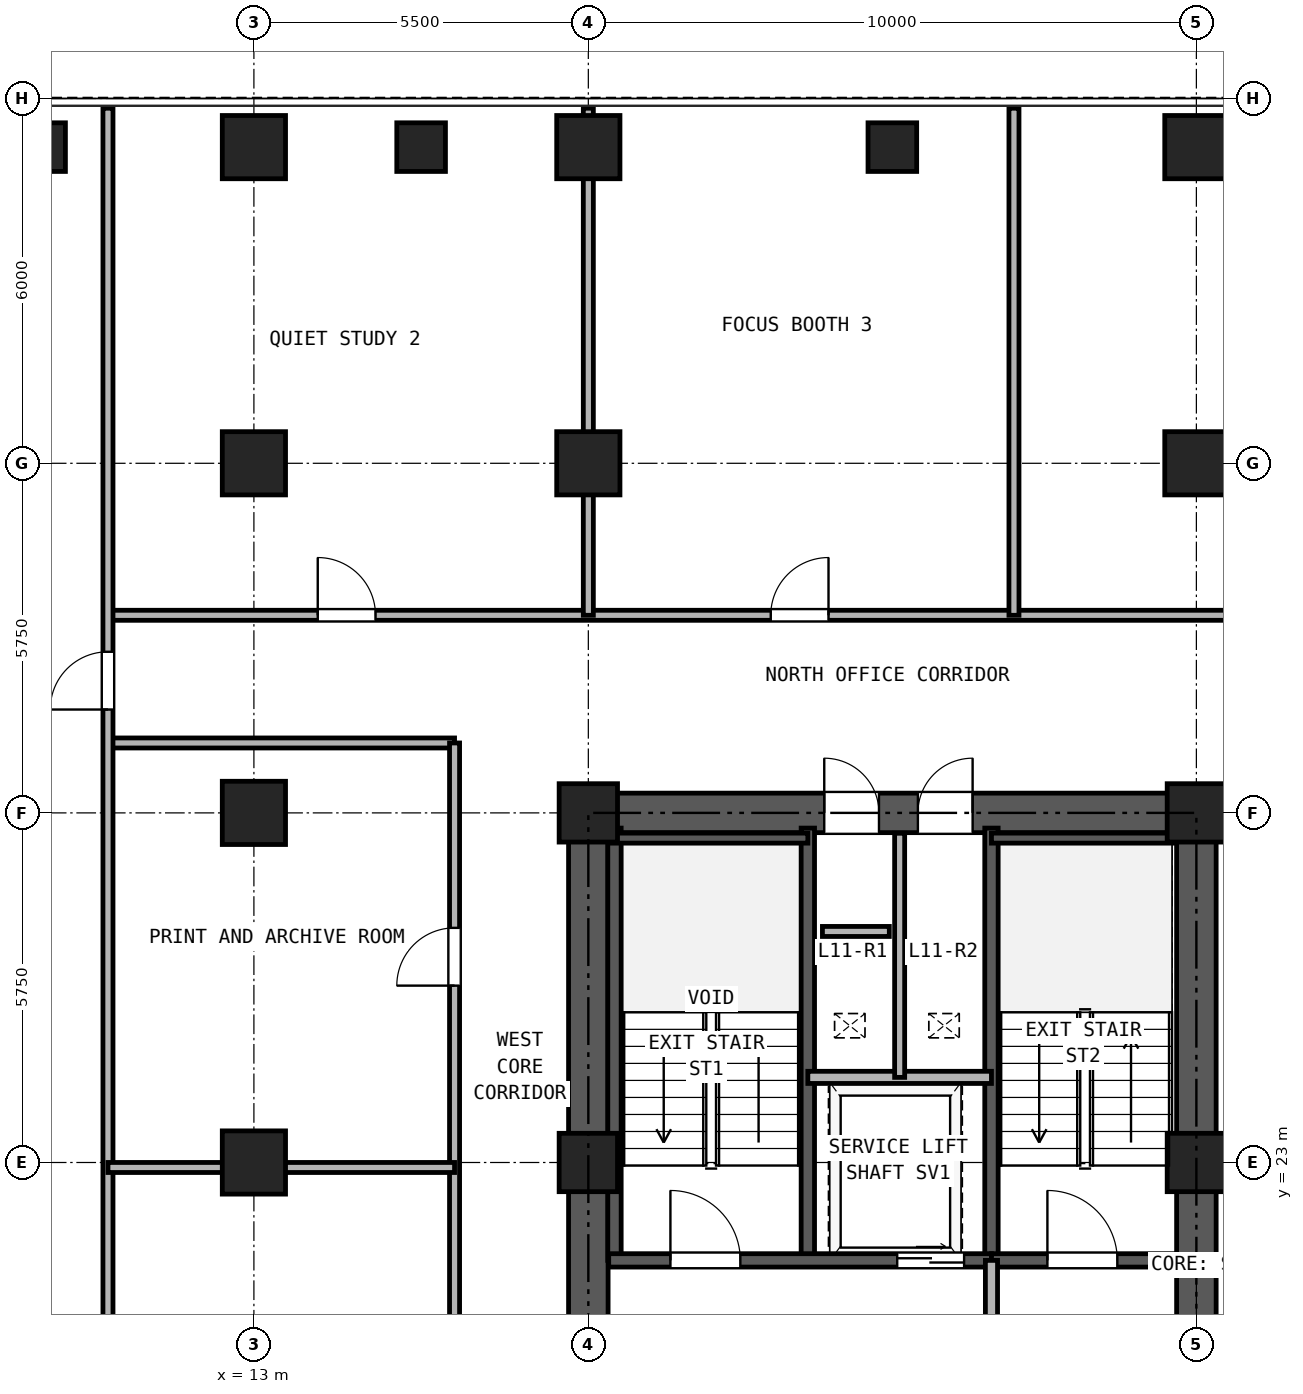
"""IFC4 building model, lengths in metres.
Left out: names, types, materials, properties, quantities, classifications, styles, units other than length and angle.
Written with IfcOpenShell. Run it as: python <this file> out.ifc"""

import sys

from ifc_helpers import new_model, si_unit, direction, frame, frame_2d, origin, origin_2d, place, context, subcontext, project, spatial, rectangle, hollow_rectangle, extrude, source, transform, mapped, element, fill, save


model = new_model("IFC4")
c1 = context("Model", 3, precision=1e-05, world=origin(), true_north=direction((0.0, 1.0)))
c2 = subcontext(c1, "Body", "Model", "MODEL_VIEW")
j1 = project(units=[si_unit("LENGTHUNIT", "METRE"), si_unit("PLANEANGLEUNIT", "RADIAN")], contexts=[c1])
p1 = place(None, origin())
s1 = spatial("IfcSite", under=j1, at=p1, CompositionType="ELEMENT")
p2 = place(p1, origin())
s2 = spatial("IfcBuilding", under=s1, at=p2, CompositionType="ELEMENT")
p3 = place(p2, frame((0.0, 0.0, 44.1)))
s3 = spatial("IfcBuildingStorey", under=s2, at=p3, CompositionType="ELEMENT", Elevation=44.1)
m1 = source(origin(), c2, "Body", "SweptSolid", [
    extrude(hollow_rectangle(XDim=1.04, YDim=1.04, WallThickness=0.065, at=origin_2d()), origin(), (0.0, 0.0, 1.0), 3.32),
])
for number, where, z_axis, x_axis in (
    (1, (13.0, 39.7, 0.0), (0.0, 0.0, 1.0), (1.0, 0.0, 0.0)),
    (2, (18.5, 39.7, 0.0), (0.0, 0.0, 1.0), (1.0, 0.0, 0.0)),
    (3, (28.5, 39.7, 0.0), (0.0, 0.0, 1.0), (1.0, 0.0, 0.0)),
    (4, (13.0, 23.0, 0.0), (0.0, 0.0, 1.0), (1.0, 0.0, 0.0)),
    (5, (13.0, 28.75, 0.0), (0.0, 0.0, 1.0), (1.0, 0.0, 0.0)),
    (6, (13.0, 34.5, 0.0), (0.0, 0.0, 1.0), (1.0, 0.0, 0.0)),
):
    element("IfcColumn", number, at=place(p3, frame(where, z_axis=z_axis, x_axis=x_axis)), inside=s3, PredefinedType="COLUMN", context=c2, shape_type="MappedRepresentation", body=[
        mapped(m1, transform((0.0, 0.0, 0.0), x_axis=(1.0, 0.0, 0.0), y_axis=(0.0, 1.0, 0.0), z_axis=(0.0, 0.0, 1.0), scale=1.0)),
    ])
m2 = source(origin(), c2, "Body", "SweptSolid", [
    extrude(hollow_rectangle(XDim=0.96, YDim=0.96, WallThickness=0.06, at=origin_2d()), origin(), (0.0, 0.0, 1.0), 3.32),
])
for number, where, z_axis, x_axis in (
    (7, (18.5, 23.0, 0.0), (0.0, 0.0, 1.0), (1.0, 0.0, 0.0)),
    (8, (18.5, 28.75, 0.0), (0.0, 0.0, 1.0), (1.0, 0.0, 0.0)),
):
    element("IfcColumn", number, at=place(p3, frame(where, z_axis=z_axis, x_axis=x_axis)), inside=s3, PredefinedType="COLUMN", context=c2, shape_type="MappedRepresentation", body=[
        mapped(m2, transform((0.0, 0.0, 0.0), x_axis=(1.0, 0.0, 0.0), y_axis=(0.0, 1.0, 0.0), z_axis=(0.0, 0.0, 1.0), scale=1.0)),
    ])
p4 = place(p3, frame((18.5, 34.5, 0.0), z_axis=(0.0, 0.0, 1.0), x_axis=(1.0, 0.0, 0.0)))
e9 = element("IfcColumn", 9, at=p4, inside=s3, PredefinedType="COLUMN", context=c2, shape_type="MappedRepresentation", body=[
    mapped(m1, transform((0.0, 0.0, 0.0), x_axis=(1.0, 0.0, 0.0), y_axis=(0.0, 1.0, 0.0), z_axis=(0.0, 0.0, 1.0), scale=1.0)),
])
for number, where, z_axis, x_axis in (
    (10, (28.5, 23.0, 0.0), (0.0, 0.0, 1.0), (1.0, 0.0, 0.0)),
    (11, (28.5, 28.75, 0.0), (0.0, 0.0, 1.0), (1.0, 0.0, 0.0)),
):
    element("IfcColumn", number, at=place(p3, frame(where, z_axis=z_axis, x_axis=x_axis)), inside=s3, PredefinedType="COLUMN", context=c2, shape_type="MappedRepresentation", body=[
        mapped(m2, transform((0.0, 0.0, 0.0), x_axis=(1.0, 0.0, 0.0), y_axis=(0.0, 1.0, 0.0), z_axis=(0.0, 0.0, 1.0), scale=1.0)),
    ])
p5 = place(p3, frame((28.5, 34.5, 0.0), z_axis=(0.0, 0.0, 1.0), x_axis=(1.0, 0.0, 0.0)))
e12 = element("IfcColumn", 12, at=p5, inside=s3, PredefinedType="COLUMN", context=c2, shape_type="MappedRepresentation", body=[
    mapped(m1, transform((0.0, 0.0, 0.0), x_axis=(1.0, 0.0, 0.0), y_axis=(0.0, 1.0, 0.0), z_axis=(0.0, 0.0, 1.0), scale=1.0)),
])
m3 = source(origin(), c2, "Body", "SweptSolid", [
    extrude(hollow_rectangle(XDim=0.8, YDim=0.8, WallThickness=0.045, at=origin_2d()), origin(), (0.0, 0.0, 1.0), 3.32),
])
for number, where, z_axis, x_axis in (
    (13, (9.5, 39.7, 0.0), (0.0, 0.0, 1.0), (1.0, 0.0, 0.0)),
    (14, (15.75, 39.7, 0.0), (0.0, 0.0, 1.0), (1.0, 0.0, 0.0)),
    (15, (23.5, 39.7, 0.0), (0.0, 0.0, 1.0), (1.0, 0.0, 0.0)),
):
    element("IfcColumn", number, at=place(p3, frame(where, z_axis=z_axis, x_axis=x_axis)), inside=s3, PredefinedType="COLUMN", context=c2, shape_type="MappedRepresentation", body=[
        mapped(m3, transform((0.0, 0.0, 0.0), x_axis=(1.0, 0.0, 0.0), y_axis=(0.0, 1.0, 0.0), z_axis=(0.0, 0.0, 1.0), scale=1.0)),
    ])
p6 = place(p3, frame((18.175, 28.75, 0.0), z_axis=(0.0, 0.0, 1.0), x_axis=(1.0, 0.0, 0.0)))
e16 = element("IfcWall", 16, at=p6, inside=s3, PredefinedType="SHEAR", context=c2, shape_type="SweptSolid", body=[
    extrude(rectangle(XDim=10.65, YDim=0.65, at=frame_2d((5.325, 0.0))), origin(), (0.0, 0.0, 1.0), 3.32),
])
p7 = place(p6, frame((4.205, 0.0, 0.0)))
e17 = element("IfcOpeningElement", 17, at=p7, cuts=e16, PredefinedType="OPENING", context=c2, shape_type="SweptSolid", body=[
    extrude(rectangle(XDim=0.9, YDim=2.05, at=frame_2d((0.45, 1.025))), frame((0.0, 0.335, 0.0), z_axis=(0.0, -1.0, 0.0), x_axis=(1.0, 0.0, 0.0)), (0.0, 0.0, 1.0), 0.67),
])
p8 = place(p6, frame((5.745, 0.0, 0.0)))
e18 = element("IfcOpeningElement", 18, at=p8, cuts=e16, PredefinedType="OPENING", context=c2, shape_type="SweptSolid", body=[
    extrude(rectangle(XDim=0.9, YDim=2.05, at=frame_2d((0.45, 1.025))), frame((0.0, 0.335, 0.0), z_axis=(0.0, -1.0, 0.0), x_axis=(1.0, 0.0, 0.0)), (0.0, 0.0, 1.0), 0.67),
])
p9 = place(p3, frame((18.5, 11.825, 0.0), z_axis=(0.0, 0.0, 1.0), x_axis=(0.0, 1.0, 0.0)))
e19 = element("IfcWall", 19, at=p9, inside=s3, PredefinedType="SHEAR", context=c2, shape_type="SweptSolid", body=[
    extrude(rectangle(XDim=16.6, YDim=0.65, at=frame_2d((8.3, 0.0))), origin(), (0.0, 0.0, 1.0), 3.32),
])
p10 = place(p9, frame((7.325, 0.0, 0.0)))
e20 = element("IfcOpeningElement", 20, at=p10, cuts=e19, PredefinedType="OPENING", context=c2, shape_type="SweptSolid", body=[
    extrude(rectangle(XDim=1.15, YDim=2.2, at=frame_2d((0.575, 1.1))), frame((0.0, 0.335, 0.0), z_axis=(0.0, -1.0, 0.0), x_axis=(1.0, 0.0, 0.0)), (0.0, 0.0, 1.0), 0.67),
])
p11 = place(p3, frame((28.5, 11.825, 0.0), z_axis=(0.0, 0.0, 1.0), x_axis=(0.0, 1.0, 0.0)))
e21 = element("IfcWall", 21, at=p11, inside=s3, PredefinedType="SHEAR", context=c2, shape_type="SweptSolid", body=[
    extrude(rectangle(XDim=16.6, YDim=0.65, at=frame_2d((8.3, 0.0))), origin(), (0.0, 0.0, 1.0), 3.32),
])
p12 = place(p11, frame((7.325, 0.0, 0.0)))
e22 = element("IfcOpeningElement", 22, at=p12, cuts=e21, PredefinedType="OPENING", context=c2, shape_type="SweptSolid", body=[
    extrude(rectangle(XDim=1.15, YDim=2.2, at=frame_2d((0.575, 1.1))), frame((0.0, 0.335, 0.0), z_axis=(0.0, -1.0, 0.0), x_axis=(1.0, 0.0, 0.0)), (0.0, 0.0, 1.0), 0.67),
])
for number, where, z_axis, x_axis in (
    (23, (18.93, 21.39, 0.0), (0.0, 0.0, 1.0), (0.0, 1.0, 0.0)),
    (24, (22.11, 21.39, 0.0), (0.0, 0.0, 1.0), (0.0, 1.0, 0.0)),
    (25, (25.13, 21.39, 0.0), (0.0, 0.0, 1.0), (0.0, 1.0, 0.0)),
):
    element("IfcWall", number, at=place(p3, frame(where, z_axis=z_axis, x_axis=x_axis)), inside=s3, PredefinedType="SOLIDWALL", context=c2, shape_type="SweptSolid", body=[
        extrude(rectangle(XDim=7.11, YDim=0.22, at=frame_2d((3.555, 0.0))), origin(), (0.0, 0.0, 1.0), 3.32),
    ])
p13 = place(p3, frame((18.835, 28.335, 0.0), z_axis=(0.0, 0.0, 1.0), x_axis=(1.0, 0.0, 0.0)))
e26 = element("IfcWall", 26, at=p13, inside=s3, PredefinedType="PARTITIONING", context=c2, shape_type="SweptSolid", body=[
    extrude(rectangle(XDim=3.275, YDim=0.165, at=frame_2d((1.638, 0.0))), origin(), (0.0, 0.0, 1.0), 3.32),
])
p14 = place(p3, frame((25.13, 28.335, 0.0), z_axis=(0.0, 0.0, 1.0), x_axis=(1.0, 0.0, 0.0)))
e27 = element("IfcWall", 27, at=p14, inside=s3, PredefinedType="PARTITIONING", context=c2, shape_type="SweptSolid", body=[
    extrude(rectangle(XDim=3.035, YDim=0.165, at=frame_2d((1.518, 0.0))), origin(), (0.0, 0.0, 1.0), 3.32),
])
p15 = place(p3, frame((18.835, 21.39, 0.0), z_axis=(0.0, 0.0, 1.0), x_axis=(1.0, 0.0, 0.0)))
e28 = element("IfcWall", 28, at=p15, inside=s3, PredefinedType="SOLIDWALL", context=c2, shape_type="SweptSolid", body=[
    extrude(rectangle(XDim=6.295, YDim=0.22, at=frame_2d((3.147, 0.0))), origin(), (0.0, 0.0, 1.0), 3.32),
])
p16 = place(p15, frame((1.015, 0.0, 0.0)))
e29 = element("IfcOpeningElement", 29, at=p16, cuts=e28, PredefinedType="OPENING", context=c2, shape_type="SweptSolid", body=[
    extrude(rectangle(XDim=1.15, YDim=2.2, at=frame_2d((0.575, 1.1))), frame((0.0, 0.12, 0.0), z_axis=(0.0, -1.0, 0.0), x_axis=(1.0, 0.0, 0.0)), (0.0, 0.0, 1.0), 0.24),
])
p17 = place(p15, frame((4.745, 0.0, 0.0)))
e30 = element("IfcOpeningElement", 30, at=p17, cuts=e28, PredefinedType="OPENING", context=c2, shape_type="SweptSolid", body=[
    extrude(rectangle(XDim=1.1, YDim=2.25, at=frame_2d((0.55, 1.125))), frame((0.0, 0.12, 0.0), z_axis=(0.0, -1.0, 0.0), x_axis=(1.0, 0.0, 0.0)), (0.0, 0.0, 1.0), 0.24),
])
p18 = place(p3, frame((25.13, 21.39, 0.0), z_axis=(0.0, 0.0, 1.0), x_axis=(1.0, 0.0, 0.0)))
e31 = element("IfcWall", 31, at=p18, inside=s3, PredefinedType="SOLIDWALL", context=c2, shape_type="SweptSolid", body=[
    extrude(rectangle(XDim=3.035, YDim=0.22, at=frame_2d((1.518, 0.0))), origin(), (0.0, 0.0, 1.0), 3.32),
])
p19 = place(p18, frame((0.92, 0.0, 0.0)))
e32 = element("IfcOpeningElement", 32, at=p19, cuts=e31, PredefinedType="OPENING", context=c2, shape_type="SweptSolid", body=[
    extrude(rectangle(XDim=1.15, YDim=2.2, at=frame_2d((0.575, 1.1))), frame((0.0, 0.12, 0.0), z_axis=(0.0, -1.0, 0.0), x_axis=(1.0, 0.0, 0.0)), (0.0, 0.0, 1.0), 0.24),
])
p20 = place(p3, frame((22.11, 24.4, 0.0), z_axis=(0.0, 0.0, 1.0), x_axis=(1.0, 0.0, 0.0)))
e33 = element("IfcWall", 33, at=p20, inside=s3, PredefinedType="PARTITIONING", context=c2, shape_type="SweptSolid", body=[
    extrude(rectangle(XDim=3.02, YDim=0.2, at=frame_2d((1.51, 0.0))), origin(), (0.0, 0.0, 1.0), 3.32),
])
p21 = place(p3, frame((23.62, 24.4, 0.0), z_axis=(0.0, 0.0, 1.0), x_axis=(0.0, 1.0, 0.0)))
e34 = element("IfcWall", 34, at=p21, inside=s3, PredefinedType="PARTITIONING", context=c2, shape_type="SweptSolid", body=[
    extrude(rectangle(XDim=4.015, YDim=0.165, at=frame_2d((2.008, 0.0))), origin(), (0.0, 0.0, 1.0), 3.32),
])
p22 = place(p3, frame((25.13, 18.0, 0.0), z_axis=(0.0, 0.0, 1.0), x_axis=(0.0, 1.0, 0.0)))
e35 = element("IfcWall", 35, at=p22, inside=s3, PredefinedType="PARTITIONING", context=c2, shape_type="SweptSolid", body=[
    extrude(rectangle(XDim=3.39, YDim=0.2, at=frame_2d((1.695, 0.0))), origin(), (0.0, 0.0, 1.0), 3.32),
])
p23 = place(p22, frame((1.1, 0.0, 0.0)))
e36 = element("IfcOpeningElement", 36, at=p23, cuts=e35, PredefinedType="OPENING", context=c2, shape_type="SweptSolid", body=[
    extrude(rectangle(XDim=1.15, YDim=2.2, at=frame_2d((0.575, 1.1))), frame((0.0, 0.11, 0.0), z_axis=(0.0, -1.0, 0.0), x_axis=(1.0, 0.0, 0.0)), (0.0, 0.0, 1.0), 0.22),
])
p24 = place(p3, frame((10.6, 32.0, 0.0), z_axis=(0.0, 0.0, 1.0), x_axis=(1.0, 0.0, 0.0)))
e37 = element("IfcWall", 37, at=p24, inside=s3, PredefinedType="PARTITIONING", context=c2, shape_type="SweptSolid", body=[
    extrude(rectangle(XDim=25.8, YDim=0.165, at=frame_2d((12.9, 0.0))), origin(), (0.0, 0.0, 1.0), 3.32),
])
p25 = place(p24, frame((3.45, 0.0, 0.0)))
e38 = element("IfcOpeningElement", 38, at=p25, cuts=e37, PredefinedType="OPENING", context=c2, shape_type="SweptSolid", body=[
    extrude(rectangle(XDim=0.95, YDim=2.15, at=frame_2d((0.475, 1.075))), frame((0.0, 0.093, 0.0), z_axis=(0.0, -1.0, 0.0), x_axis=(1.0, 0.0, 0.0)), (0.0, 0.0, 1.0), 0.185),
])
p26 = place(p24, frame((10.9, 0.0, 0.0)))
e39 = element("IfcOpeningElement", 39, at=p26, cuts=e37, PredefinedType="OPENING", context=c2, shape_type="SweptSolid", body=[
    extrude(rectangle(XDim=0.95, YDim=2.15, at=frame_2d((0.475, 1.075))), frame((0.0, 0.093, 0.0), z_axis=(0.0, -1.0, 0.0), x_axis=(1.0, 0.0, 0.0)), (0.0, 0.0, 1.0), 0.185),
])
p27 = place(p24, frame((19.85, 0.0, 0.0)))
e40 = element("IfcOpeningElement", 40, at=p27, cuts=e37, PredefinedType="OPENING", context=c2, shape_type="SweptSolid", body=[
    extrude(rectangle(XDim=0.95, YDim=2.15, at=frame_2d((0.475, 1.075))), frame((0.0, 0.093, 0.0), z_axis=(0.0, -1.0, 0.0), x_axis=(1.0, 0.0, 0.0)), (0.0, 0.0, 1.0), 0.185),
])
p28 = place(p3, frame((10.6, 29.9, 0.0), z_axis=(0.0, 0.0, 1.0), x_axis=(1.0, 0.0, 0.0)))
e41 = element("IfcWall", 41, at=p28, inside=s3, PredefinedType="PARTITIONING", context=c2, shape_type="SweptSolid", body=[
    extrude(rectangle(XDim=5.7, YDim=0.165, at=frame_2d((2.85, 0.0))), origin(), (0.0, 0.0, 1.0), 3.32),
])
p29 = place(p3, frame((16.3, 10.2, 0.0), z_axis=(0.0, 0.0, 1.0), x_axis=(0.0, 1.0, 0.0)))
e42 = element("IfcWall", 42, at=p29, inside=s3, PredefinedType="PARTITIONING", context=c2, shape_type="SweptSolid", body=[
    extrude(rectangle(XDim=19.7, YDim=0.165, at=frame_2d((9.85, 0.0))), origin(), (0.0, 0.0, 1.0), 3.32),
])
p30 = place(p29, frame((5.859, 0.0, 0.0)))
e43 = element("IfcOpeningElement", 43, at=p30, cuts=e42, PredefinedType="OPENING", context=c2, shape_type="SweptSolid", body=[
    extrude(rectangle(XDim=0.95, YDim=2.15, at=frame_2d((0.475, 1.075))), frame((0.0, 0.093, 0.0), z_axis=(0.0, -1.0, 0.0), x_axis=(1.0, 0.0, 0.0)), (0.0, 0.0, 1.0), 0.185),
])
p31 = place(p29, frame((15.709, 0.0, 0.0)))
e44 = element("IfcOpeningElement", 44, at=p31, cuts=e42, PredefinedType="OPENING", context=c2, shape_type="SweptSolid", body=[
    extrude(rectangle(XDim=0.95, YDim=2.15, at=frame_2d((0.475, 1.075))), frame((0.0, 0.093, 0.0), z_axis=(0.0, -1.0, 0.0), x_axis=(1.0, 0.0, 0.0)), (0.0, 0.0, 1.0), 0.185),
])
p32 = place(p3, frame((10.6, 0.16, 0.0), z_axis=(0.0, 0.0, 1.0), x_axis=(0.0, 1.0, 0.0)))
e45 = element("IfcWall", 45, at=p32, inside=s3, PredefinedType="PARTITIONING", context=c2, shape_type="SweptSolid", body=[
    extrude(rectangle(XDim=40.18, YDim=0.165, at=frame_2d((20.09, 0.0))), origin(), (0.0, 0.0, 1.0), 3.32),
])
p33 = place(p32, frame((8.49, 0.0, 0.0)))
e46 = element("IfcOpeningElement", 46, at=p33, cuts=e45, PredefinedType="OPENING", context=c2, shape_type="SweptSolid", body=[
    extrude(rectangle(XDim=0.95, YDim=2.15, at=frame_2d((0.475, 1.075))), frame((0.0, 0.093, 0.0), z_axis=(0.0, -1.0, 0.0), x_axis=(1.0, 0.0, 0.0)), (0.0, 0.0, 1.0), 0.185),
])
p34 = place(p32, frame((30.29, 0.0, 0.0)))
e47 = element("IfcOpeningElement", 47, at=p34, cuts=e45, PredefinedType="OPENING", context=c2, shape_type="SweptSolid", body=[
    extrude(rectangle(XDim=0.95, YDim=2.15, at=frame_2d((0.475, 1.075))), frame((0.0, 0.093, 0.0), z_axis=(0.0, -1.0, 0.0), x_axis=(1.0, 0.0, 0.0)), (0.0, 0.0, 1.0), 0.185),
])
p35 = place(p3, frame((18.5, 32.0, 0.0), z_axis=(0.0, 0.0, 1.0), x_axis=(0.0, 1.0, 0.0)))
e48 = element("IfcWall", 48, at=p35, inside=s3, PredefinedType="PARTITIONING", context=c2, shape_type="SweptSolid", body=[
    extrude(rectangle(XDim=8.34, YDim=0.165, at=frame_2d((4.17, 0.0))), origin(), (0.0, 0.0, 1.0), 2.539),
])
p36 = place(p3, frame((25.5, 32.0, 0.0), z_axis=(0.0, 0.0, 1.0), x_axis=(0.0, 1.0, 0.0)))
e49 = element("IfcWall", 49, at=p36, inside=s3, PredefinedType="PARTITIONING", context=c2, shape_type="SweptSolid", body=[
    extrude(rectangle(XDim=8.34, YDim=0.165, at=frame_2d((4.17, 0.0))), origin(), (0.0, 0.0, 1.0), 3.32),
])
p37 = place(p3, frame((10.6, 22.918, 0.0), z_axis=(0.0, 0.0, 1.0), x_axis=(1.0, 0.0, 0.0)))
e50 = element("IfcWall", 50, at=p37, inside=s3, PredefinedType="PARTITIONING", context=c2, shape_type="SweptSolid", body=[
    extrude(rectangle(XDim=5.7, YDim=0.165, at=frame_2d((2.85, 0.0))), origin(), (0.0, 0.0, 1.0), 2.539),
])
p38 = place(p3, frame((22.35, 26.8, 0.0), z_axis=(0.0, 0.0, 1.0), x_axis=(1.0, 0.0, 0.0)))
e51 = element("IfcWall", 51, at=p38, inside=s3, PredefinedType="PARTITIONING", context=c2, shape_type="SweptSolid", body=[
    extrude(rectangle(XDim=1.1, YDim=0.165, at=frame_2d((0.55, 0.0))), origin(), (0.0, 0.0, 1.0), 3.32),
])
p39 = place(p16, frame((1.15, 0.0, 0.0), z_axis=(0.0, 0.0, 1.0), x_axis=(-1.0, 0.0, 0.0)))
e52 = element("IfcDoor", 52, at=p39, inside=s3, OperationType="SINGLE_SWING_LEFT", PredefinedType="DOOR", context=c2, shape_type="SweptSolid", body=[
    extrude(rectangle(XDim=1.15, YDim=2.2, at=frame_2d((0.575, 1.1))), frame((0.0, 0.025, 0.0), z_axis=(0.0, -1.0, 0.0), x_axis=(1.0, 0.0, 0.0)), (0.0, 0.0, 1.0), 0.05),
])
fill(e29, e52)
p40 = place(p19, frame((1.15, 0.0, 0.0), z_axis=(0.0, 0.0, 1.0), x_axis=(-1.0, 0.0, 0.0)))
e53 = element("IfcDoor", 53, at=p40, inside=s3, OperationType="SINGLE_SWING_LEFT", PredefinedType="DOOR", context=c2, shape_type="SweptSolid", body=[
    extrude(rectangle(XDim=1.15, YDim=2.2, at=frame_2d((0.575, 1.1))), frame((0.0, 0.025, 0.0), z_axis=(0.0, -1.0, 0.0), x_axis=(1.0, 0.0, 0.0)), (0.0, 0.0, 1.0), 0.05),
])
fill(e32, e53)
p41 = place(p17, frame((1.1, 0.0, 0.0), z_axis=(0.0, 0.0, 1.0), x_axis=(-1.0, 0.0, 0.0)))
e54 = element("IfcDoor", 54, at=p41, inside=s3, OperationType="DOUBLE_DOOR_SLIDING", PredefinedType="DOOR", context=c2, shape_type="SweptSolid", body=[
    extrude(rectangle(XDim=1.1, YDim=2.25, at=frame_2d((0.55, 1.125))), frame((0.0, 0.025, 0.0), z_axis=(0.0, -1.0, 0.0), x_axis=(1.0, 0.0, 0.0)), (0.0, 0.0, 1.0), 0.05),
])
fill(e30, e54)
p42 = place(p7, origin())
e55 = element("IfcDoor", 55, at=p42, inside=s3, OperationType="SINGLE_SWING_LEFT", PredefinedType="DOOR", context=c2, shape_type="SweptSolid", body=[
    extrude(rectangle(XDim=0.9, YDim=2.05, at=frame_2d((0.45, 1.025))), frame((0.0, 0.025, 0.0), z_axis=(0.0, -1.0, 0.0), x_axis=(1.0, 0.0, 0.0)), (0.0, 0.0, 1.0), 0.05),
])
fill(e17, e55)
p43 = place(p8, origin())
e56 = element("IfcDoor", 56, at=p43, inside=s3, OperationType="SINGLE_SWING_RIGHT", PredefinedType="DOOR", context=c2, shape_type="SweptSolid", body=[
    extrude(rectangle(XDim=0.9, YDim=2.05, at=frame_2d((0.45, 1.025))), frame((0.0, 0.025, 0.0), z_axis=(0.0, -1.0, 0.0), x_axis=(1.0, 0.0, 0.0)), (0.0, 0.0, 1.0), 0.05),
])
fill(e18, e56)
p44 = place(p25, origin())
e57 = element("IfcDoor", 57, at=p44, inside=s3, OperationType="SINGLE_SWING_LEFT", PredefinedType="DOOR", context=c2, shape_type="SweptSolid", body=[
    extrude(rectangle(XDim=0.95, YDim=2.15, at=frame_2d((0.475, 1.075))), frame((0.0, 0.025, 0.0), z_axis=(0.0, -1.0, 0.0), x_axis=(1.0, 0.0, 0.0)), (0.0, 0.0, 1.0), 0.05),
])
fill(e38, e57)
p45 = place(p26, origin())
e58 = element("IfcDoor", 58, at=p45, inside=s3, OperationType="SINGLE_SWING_RIGHT", PredefinedType="DOOR", context=c2, shape_type="SweptSolid", body=[
    extrude(rectangle(XDim=0.95, YDim=2.15, at=frame_2d((0.475, 1.075))), frame((0.0, 0.025, 0.0), z_axis=(0.0, -1.0, 0.0), x_axis=(1.0, 0.0, 0.0)), (0.0, 0.0, 1.0), 0.05),
])
fill(e39, e58)
p46 = place(p34, frame((0.95, 0.0, 0.0), z_axis=(0.0, 0.0, 1.0), x_axis=(-1.0, 0.0, 0.0)))
e59 = element("IfcDoor", 59, at=p46, inside=s3, OperationType="SINGLE_SWING_LEFT", PredefinedType="DOOR", context=c2, shape_type="SweptSolid", body=[
    extrude(rectangle(XDim=0.95, YDim=2.15, at=frame_2d((0.475, 1.075))), frame((0.0, 0.025, 0.0), z_axis=(0.0, -1.0, 0.0), x_axis=(1.0, 0.0, 0.0)), (0.0, 0.0, 1.0), 0.05),
])
fill(e47, e59)
p47 = place(p31, frame((0.95, 0.0, 0.0), z_axis=(0.0, 0.0, 1.0), x_axis=(-1.0, 0.0, 0.0)))
e60 = element("IfcDoor", 60, at=p47, inside=s3, OperationType="SINGLE_SWING_LEFT", PredefinedType="DOOR", context=c2, shape_type="SweptSolid", body=[
    extrude(rectangle(XDim=0.95, YDim=2.15, at=frame_2d((0.475, 1.075))), frame((0.0, 0.025, 0.0), z_axis=(0.0, -1.0, 0.0), x_axis=(1.0, 0.0, 0.0)), (0.0, 0.0, 1.0), 0.05),
])
fill(e44, e60)
save(model, sys.argv[1])
